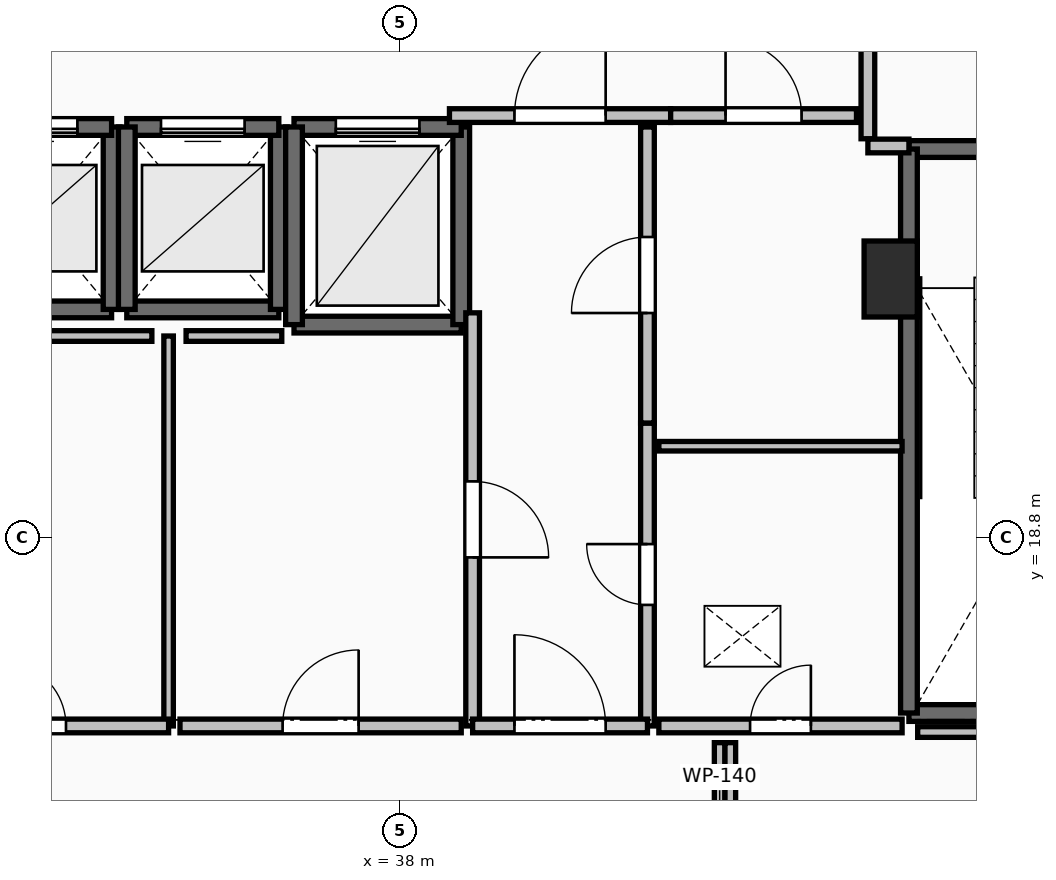
"""IFC4 building model, lengths in metres.
Left out: names, types, materials, properties, quantities, classifications, styles, units other than length and angle.
Written with IfcOpenShell. Run it as: python <this file> out.ifc"""

import sys

from ifc_helpers import new_model, si_unit, direction, frame, frame_2d, origin, origin_2d, place, context, subcontext, project, spatial, rectangle, extrude, element, fill, save


model = new_model("IFC4")
c1 = context("Model", 3, precision=1e-05, world=origin(), true_north=direction((0.0, 1.0)))
c2 = subcontext(c1, "Body", "Model", "MODEL_VIEW")
j1 = project(units=[si_unit("LENGTHUNIT", "METRE"), si_unit("PLANEANGLEUNIT", "RADIAN")], contexts=[c1])
p1 = place(None, origin())
s1 = spatial("IfcSite", under=j1, at=p1, CompositionType="ELEMENT")
p2 = place(p1, origin())
s2 = spatial("IfcBuilding", under=s1, at=p2, CompositionType="ELEMENT")
p3 = place(p2, frame((0.0, 0.0, 217.85)))
s3 = spatial("IfcBuildingStorey", under=s2, at=p3, CompositionType="ELEMENT", Elevation=217.85)
p4 = place(p3, frame((44.45, 22.2, 0.0), z_axis=(0.0, 0.0, 1.0), x_axis=(1.0, 0.0, 0.0)))
e1 = element("IfcColumn", 1, at=p4, inside=s3, PredefinedType="PILASTER", context=c2, shape_type="SweptSolid", body=[
    extrude(rectangle(XDim=0.7, YDim=1.0, at=origin_2d()), origin(), (0.0, 0.0, 1.0), 3.55),
])
p5 = place(p3, frame((44.69, 23.91, 0.0), z_axis=(0.0, 0.0, 1.0), x_axis=(1.0, 0.0, 0.0)))
e2 = element("IfcWall", 2, at=p5, inside=s3, PredefinedType="SOLIDWALL", context=c2, shape_type="SweptSolid", body=[
    extrude(rectangle(XDim=3.37, YDim=0.22, at=frame_2d((1.685, 0.0))), origin(), (0.0, 0.0, 1.0), 3.29),
])
p6 = place(p5, frame((1.135, 0.0, 0.0)))
e3 = element("IfcOpeningElement", 3, at=p6, cuts=e2, PredefinedType="OPENING", context=c2, shape_type="SweptSolid", body=[
    extrude(rectangle(XDim=1.1, YDim=2.15, at=frame_2d((0.55, 1.075))), frame((0.0, 0.125, 0.0), z_axis=(0.0, -1.0, 0.0), x_axis=(1.0, 0.0, 0.0)), (0.0, 0.0, 1.0), 0.25),
])
p7 = place(p3, frame((48.06, 16.49, 0.0), z_axis=(0.0, 0.0, 1.0), x_axis=(-1.0, 0.0, 0.0)))
e4 = element("IfcWall", 4, at=p7, inside=s3, PredefinedType="SOLIDWALL", context=c2, shape_type="SweptSolid", body=[
    extrude(rectangle(XDim=3.37, YDim=0.22, at=frame_2d((1.685, 0.0))), origin(), (0.0, 0.0, 1.0), 3.29),
])
p8 = place(p3, frame((44.69, 16.49, 0.0), z_axis=(0.0, 0.0, 1.0), x_axis=(0.0, 1.0, 0.0)))
e5 = element("IfcWall", 5, at=p8, inside=s3, PredefinedType="SOLIDWALL", context=c2, shape_type="SweptSolid", body=[
    extrude(rectangle(XDim=7.42, YDim=0.22, at=frame_2d((3.71, 0.0))), origin(), (0.0, 0.0, 1.0), 3.29),
])
p9 = place(p3, frame((32.2, 21.8, 0.0), z_axis=(0.0, 0.0, 1.0), x_axis=(1.0, 0.0, 0.0)))
e6 = element("IfcWall", 6, at=p9, inside=s3, PredefinedType="SOLIDWALL", context=c2, shape_type="SweptSolid", body=[
    extrude(rectangle(XDim=2.0, YDim=0.22, at=frame_2d((1.0, 0.0))), origin(), (0.0, 0.0, 1.0), 3.29),
])
p10 = place(p3, frame((34.2, 21.8, 0.0), z_axis=(0.0, 0.0, 1.0), x_axis=(0.0, 1.0, 0.0)))
e7 = element("IfcWall", 7, at=p10, inside=s3, PredefinedType="SOLIDWALL", context=c2, shape_type="SweptSolid", body=[
    extrude(rectangle(XDim=2.4, YDim=0.22, at=frame_2d((1.2, 0.0))), origin(), (0.0, 0.0, 1.0), 3.29),
])
p11 = place(p3, frame((34.2, 24.2, 0.0), z_axis=(0.0, 0.0, 1.0), x_axis=(-1.0, 0.0, 0.0)))
e8 = element("IfcWall", 8, at=p11, inside=s3, PredefinedType="SOLIDWALL", context=c2, shape_type="SweptSolid", body=[
    extrude(rectangle(XDim=2.0, YDim=0.22, at=frame_2d((1.0, 0.0))), origin(), (0.0, 0.0, 1.0), 3.29),
])
p12 = place(p11, frame((0.45, 0.0, 0.0)))
e9 = element("IfcOpeningElement", 9, at=p12, cuts=e8, PredefinedType="OPENING", context=c2, shape_type="SweptSolid", body=[
    extrude(rectangle(XDim=1.1, YDim=2.2, at=frame_2d((0.55, 1.1))), frame((0.0, 0.125, 0.0), z_axis=(0.0, -1.0, 0.0), x_axis=(1.0, 0.0, 0.0)), (0.0, 0.0, 1.0), 0.25),
])
p13 = place(p3, frame((34.4, 21.8, 0.0), z_axis=(0.0, 0.0, 1.0), x_axis=(1.0, 0.0, 0.0)))
e10 = element("IfcWall", 10, at=p13, inside=s3, PredefinedType="SOLIDWALL", context=c2, shape_type="SweptSolid", body=[
    extrude(rectangle(XDim=2.0, YDim=0.22, at=frame_2d((1.0, 0.0))), origin(), (0.0, 0.0, 1.0), 3.29),
])
p14 = place(p3, frame((36.4, 21.8, 0.0), z_axis=(0.0, 0.0, 1.0), x_axis=(0.0, 1.0, 0.0)))
e11 = element("IfcWall", 11, at=p14, inside=s3, PredefinedType="SOLIDWALL", context=c2, shape_type="SweptSolid", body=[
    extrude(rectangle(XDim=2.4, YDim=0.22, at=frame_2d((1.2, 0.0))), origin(), (0.0, 0.0, 1.0), 3.29),
])
p15 = place(p3, frame((36.4, 24.2, 0.0), z_axis=(0.0, 0.0, 1.0), x_axis=(-1.0, 0.0, 0.0)))
e12 = element("IfcWall", 12, at=p15, inside=s3, PredefinedType="SOLIDWALL", context=c2, shape_type="SweptSolid", body=[
    extrude(rectangle(XDim=2.0, YDim=0.22, at=frame_2d((1.0, 0.0))), origin(), (0.0, 0.0, 1.0), 3.29),
])
p16 = place(p15, frame((0.45, 0.0, 0.0)))
e13 = element("IfcOpeningElement", 13, at=p16, cuts=e12, PredefinedType="OPENING", context=c2, shape_type="SweptSolid", body=[
    extrude(rectangle(XDim=1.1, YDim=2.2, at=frame_2d((0.55, 1.1))), frame((0.0, 0.125, 0.0), z_axis=(0.0, -1.0, 0.0), x_axis=(1.0, 0.0, 0.0)), (0.0, 0.0, 1.0), 0.25),
])
p17 = place(p3, frame((34.4, 24.2, 0.0), z_axis=(0.0, 0.0, 1.0), x_axis=(0.0, -1.0, 0.0)))
e14 = element("IfcWall", 14, at=p17, inside=s3, PredefinedType="SOLIDWALL", context=c2, shape_type="SweptSolid", body=[
    extrude(rectangle(XDim=2.4, YDim=0.22, at=frame_2d((1.2, 0.0))), origin(), (0.0, 0.0, 1.0), 3.29),
])
p18 = place(p3, frame((36.6, 21.6, 0.0), z_axis=(0.0, 0.0, 1.0), x_axis=(1.0, 0.0, 0.0)))
e15 = element("IfcWall", 15, at=p18, inside=s3, PredefinedType="SOLIDWALL", context=c2, shape_type="SweptSolid", body=[
    extrude(rectangle(XDim=2.2, YDim=0.22, at=frame_2d((1.1, 0.0))), origin(), (0.0, 0.0, 1.0), 3.29),
])
p19 = place(p3, frame((38.8, 21.6, 0.0), z_axis=(0.0, 0.0, 1.0), x_axis=(0.0, 1.0, 0.0)))
e16 = element("IfcWall", 16, at=p19, inside=s3, PredefinedType="SOLIDWALL", context=c2, shape_type="SweptSolid", body=[
    extrude(rectangle(XDim=2.6, YDim=0.22, at=frame_2d((1.3, 0.0))), origin(), (0.0, 0.0, 1.0), 3.29),
])
p20 = place(p3, frame((38.8, 24.2, 0.0), z_axis=(0.0, 0.0, 1.0), x_axis=(-1.0, 0.0, 0.0)))
e17 = element("IfcWall", 17, at=p20, inside=s3, PredefinedType="SOLIDWALL", context=c2, shape_type="SweptSolid", body=[
    extrude(rectangle(XDim=2.2, YDim=0.22, at=frame_2d((1.1, 0.0))), origin(), (0.0, 0.0, 1.0), 3.29),
])
p21 = place(p20, frame((0.55, 0.0, 0.0)))
e18 = element("IfcOpeningElement", 18, at=p21, cuts=e17, PredefinedType="OPENING", context=c2, shape_type="SweptSolid", body=[
    extrude(rectangle(XDim=1.1, YDim=2.2, at=frame_2d((0.55, 1.1))), frame((0.0, 0.125, 0.0), z_axis=(0.0, -1.0, 0.0), x_axis=(1.0, 0.0, 0.0)), (0.0, 0.0, 1.0), 0.25),
])
p22 = place(p3, frame((36.6, 24.2, 0.0), z_axis=(0.0, 0.0, 1.0), x_axis=(0.0, -1.0, 0.0)))
e19 = element("IfcWall", 19, at=p22, inside=s3, PredefinedType="SOLIDWALL", context=c2, shape_type="SweptSolid", body=[
    extrude(rectangle(XDim=2.6, YDim=0.22, at=frame_2d((1.3, 0.0))), origin(), (0.0, 0.0, 1.0), 3.29),
])
p23 = place(p3, frame((44.15, 27.955, 0.0), z_axis=(0.0, 0.0, 1.0), x_axis=(0.0, -1.0, 0.0)))
e20 = element("IfcWall", 20, at=p23, inside=s3, PredefinedType="PARTITIONING", context=c2, shape_type="SweptSolid", body=[
    extrude(rectangle(XDim=3.91, YDim=0.18, at=frame_2d((1.955, 0.0))), origin(), (0.0, 0.0, 1.0), 3.29),
])
p24 = place(p23, frame((1.355, 0.0, 0.0)))
e21 = element("IfcOpeningElement", 21, at=p24, cuts=e20, PredefinedType="OPENING", context=c2, shape_type="SweptSolid", body=[
    extrude(rectangle(XDim=1.2, YDim=2.15, at=frame_2d((0.6, 1.075))), frame((0.0, 0.105, 0.0), z_axis=(0.0, -1.0, 0.0), x_axis=(1.0, 0.0, 0.0)), (0.0, 0.0, 1.0), 0.21),
])
p25 = place(p3, frame((44.15, 23.95, 0.0), z_axis=(0.0, 0.0, 1.0), x_axis=(1.0, 0.0, 0.0)))
e22 = element("IfcWall", 22, at=p25, inside=s3, PredefinedType="PARTITIONING", context=c2, shape_type="SweptSolid", body=[
    extrude(rectangle(XDim=0.54, YDim=0.18, at=frame_2d((0.27, 0.0))), origin(), (0.0, 0.0, 1.0), 3.29),
])
p26 = place(p3, frame((38.645, 24.35, 0.0), z_axis=(0.0, 0.0, 1.0), x_axis=(1.0, 0.0, 0.0)))
e23 = element("IfcWall", 23, at=p26, inside=s3, PredefinedType="PARTITIONING", context=c2, shape_type="SweptSolid", body=[
    extrude(rectangle(XDim=2.91, YDim=0.18, at=frame_2d((1.455, 0.0))), origin(), (0.0, 0.0, 1.0), 3.29),
])
p27 = place(p26, frame((0.855, 0.0, 0.0)))
e24 = element("IfcOpeningElement", 24, at=p27, cuts=e23, PredefinedType="OPENING", context=c2, shape_type="SweptSolid", body=[
    extrude(rectangle(XDim=1.2, YDim=2.15, at=frame_2d((0.6, 1.075))), frame((0.0, 0.105, 0.0), z_axis=(0.0, -1.0, 0.0), x_axis=(1.0, 0.0, 0.0)), (0.0, 0.0, 1.0), 0.21),
])
p28 = place(p3, frame((41.555, 24.35, 0.0), z_axis=(0.0, 0.0, 1.0), x_axis=(1.0, 0.0, 0.0)))
e25 = element("IfcWall", 25, at=p28, inside=s3, PredefinedType="PARTITIONING", context=c2, shape_type="SweptSolid", body=[
    extrude(rectangle(XDim=2.445, YDim=0.18, at=frame_2d((1.223, 0.0))), origin(), (0.0, 0.0, 1.0), 3.29),
])
p29 = place(p28, frame((0.722, 0.0, 0.0)))
e26 = element("IfcOpeningElement", 26, at=p29, cuts=e25, PredefinedType="OPENING", context=c2, shape_type="SweptSolid", body=[
    extrude(rectangle(XDim=1.0, YDim=2.15, at=frame_2d((0.5, 1.075))), frame((0.0, 0.105, 0.0), z_axis=(0.0, -1.0, 0.0), x_axis=(1.0, 0.0, 0.0)), (0.0, 0.0, 1.0), 0.21),
])
p30 = place(p3, frame((41.25, 16.32, 0.0), z_axis=(0.0, 0.0, 1.0), x_axis=(0.0, 1.0, 0.0)))
e27 = element("IfcWall", 27, at=p30, inside=s3, PredefinedType="PARTITIONING", context=c2, shape_type="SweptSolid", body=[
    extrude(rectangle(XDim=3.985, YDim=0.18, at=frame_2d((1.992, 0.0))), origin(), (0.0, 0.0, 1.0), 3.29),
])
p31 = place(p30, frame((1.593, 0.0, 0.0)))
e28 = element("IfcOpeningElement", 28, at=p31, cuts=e27, PredefinedType="OPENING", context=c2, shape_type="SweptSolid", body=[
    extrude(rectangle(XDim=0.8, YDim=2.05, at=frame_2d((0.4, 1.025))), frame((0.0, 0.105, 0.0), z_axis=(0.0, -1.0, 0.0), x_axis=(1.0, 0.0, 0.0)), (0.0, 0.0, 1.0), 0.21),
])
p32 = place(p3, frame((41.25, 20.305, 0.0), z_axis=(0.0, 0.0, 1.0), x_axis=(0.0, 1.0, 0.0)))
e29 = element("IfcWall", 29, at=p32, inside=s3, PredefinedType="PARTITIONING", context=c2, shape_type="SweptSolid", body=[
    extrude(rectangle(XDim=3.895, YDim=0.18, at=frame_2d((1.948, 0.0))), origin(), (0.0, 0.0, 1.0), 3.29),
])
p33 = place(p32, frame((1.448, 0.0, 0.0)))
e30 = element("IfcOpeningElement", 30, at=p33, cuts=e29, PredefinedType="OPENING", context=c2, shape_type="SweptSolid", body=[
    extrude(rectangle(XDim=1.0, YDim=2.15, at=frame_2d((0.5, 1.075))), frame((0.0, 0.105, 0.0), z_axis=(0.0, -1.0, 0.0), x_axis=(1.0, 0.0, 0.0)), (0.0, 0.0, 1.0), 0.21),
])
p34 = place(p3, frame((38.95, 21.755, 0.0), z_axis=(0.0, 0.0, 1.0), x_axis=(0.0, -1.0, 0.0)))
e31 = element("IfcWall", 31, at=p34, inside=s3, PredefinedType="PARTITIONING", context=c2, shape_type="SweptSolid", body=[
    extrude(rectangle(XDim=5.435, YDim=0.18, at=frame_2d((2.717, 0.0))), origin(), (0.0, 0.0, 1.0), 3.29),
])
p35 = place(p34, frame((2.218, 0.0, 0.0)))
e32 = element("IfcOpeningElement", 32, at=p35, cuts=e31, PredefinedType="OPENING", context=c2, shape_type="SweptSolid", body=[
    extrude(rectangle(XDim=1.0, YDim=2.15, at=frame_2d((0.5, 1.075))), frame((0.0, 0.105, 0.0), z_axis=(0.0, -1.0, 0.0), x_axis=(1.0, 0.0, 0.0)), (0.0, 0.0, 1.0), 0.21),
])
p36 = place(p3, frame((38.95, 16.32, 0.0), z_axis=(0.0, 0.0, 1.0), x_axis=(1.0, 0.0, 0.0)))
e33 = element("IfcWall", 33, at=p36, inside=s3, PredefinedType="PARTITIONING", context=c2, shape_type="SweptSolid", body=[
    extrude(rectangle(XDim=2.3, YDim=0.18, at=frame_2d((1.15, 0.0))), origin(), (0.0, 0.0, 1.0), 3.29),
])
p37 = place(p36, frame((0.55, 0.0, 0.0)))
e34 = element("IfcOpeningElement", 34, at=p37, cuts=e33, PredefinedType="OPENING", context=c2, shape_type="SweptSolid", body=[
    extrude(rectangle(XDim=1.2, YDim=2.15, at=frame_2d((0.6, 1.075))), frame((0.0, 0.105, 0.0), z_axis=(0.0, -1.0, 0.0), x_axis=(1.0, 0.0, 0.0)), (0.0, 0.0, 1.0), 0.21),
])
p38 = place(p3, frame((44.6, 20.0, 0.0), z_axis=(0.0, 0.0, 1.0), x_axis=(-1.0, 0.0, 0.0)))
e35 = element("IfcWall", 35, at=p38, inside=s3, PredefinedType="PARTITIONING", context=c2, shape_type="SweptSolid", body=[
    extrude(rectangle(XDim=3.2, YDim=0.125, at=frame_2d((1.6, 0.0))), origin(), (0.0, 0.0, 1.0), 3.29),
])
p39 = place(p3, frame((41.4, 16.32, 0.0), z_axis=(0.0, 0.0, 1.0), x_axis=(1.0, 0.0, 0.0)))
e36 = element("IfcWall", 36, at=p39, inside=s3, PredefinedType="PARTITIONING", context=c2, shape_type="SweptSolid", body=[
    extrude(rectangle(XDim=3.2, YDim=0.18, at=frame_2d((1.6, 0.0))), origin(), (0.0, 0.0, 1.0), 3.29),
])
p40 = place(p39, frame((1.2, 0.0, 0.0)))
e37 = element("IfcOpeningElement", 37, at=p40, cuts=e36, PredefinedType="OPENING", context=c2, shape_type="SweptSolid", body=[
    extrude(rectangle(XDim=0.8, YDim=2.05, at=frame_2d((0.4, 1.025))), frame((0.0, 0.105, 0.0), z_axis=(0.0, -1.0, 0.0), x_axis=(1.0, 0.0, 0.0)), (0.0, 0.0, 1.0), 0.21),
])
p41 = place(p3, frame((34.95, 16.32, 0.0), z_axis=(0.0, 0.0, 1.0), x_axis=(0.0, 1.0, 0.0)))
e38 = element("IfcWall", 38, at=p41, inside=s3, PredefinedType="PARTITIONING", context=c2, shape_type="SweptSolid", body=[
    extrude(rectangle(XDim=5.13, YDim=0.125, at=frame_2d((2.565, 0.0))), origin(), (0.0, 0.0, 1.0), 3.29),
])
p42 = place(p3, frame((31.4, 16.32, 0.0), z_axis=(0.0, 0.0, 1.0), x_axis=(1.0, 0.0, 0.0)))
e39 = element("IfcWall", 39, at=p42, inside=s3, PredefinedType="PARTITIONING", context=c2, shape_type="SweptSolid", body=[
    extrude(rectangle(XDim=3.55, YDim=0.18, at=frame_2d((1.775, 0.0))), origin(), (0.0, 0.0, 1.0), 3.29),
])
p43 = place(p42, frame((1.35, 0.0, 0.0)))
e40 = element("IfcOpeningElement", 40, at=p43, cuts=e39, PredefinedType="OPENING", context=c2, shape_type="SweptSolid", body=[
    extrude(rectangle(XDim=0.85, YDim=2.1, at=frame_2d((0.425, 1.05))), frame((0.0, 0.105, 0.0), z_axis=(0.0, -1.0, 0.0), x_axis=(1.0, 0.0, 0.0)), (0.0, 0.0, 1.0), 0.21),
])
p44 = place(p3, frame((35.1, 16.32, 0.0), z_axis=(0.0, 0.0, 1.0), x_axis=(1.0, 0.0, 0.0)))
e41 = element("IfcWall", 41, at=p44, inside=s3, PredefinedType="PARTITIONING", context=c2, shape_type="SweptSolid", body=[
    extrude(rectangle(XDim=3.7, YDim=0.18, at=frame_2d((1.85, 0.0))), origin(), (0.0, 0.0, 1.0), 3.29),
])
p45 = place(p44, frame((1.35, 0.0, 0.0)))
e42 = element("IfcOpeningElement", 42, at=p45, cuts=e41, PredefinedType="OPENING", context=c2, shape_type="SweptSolid", body=[
    extrude(rectangle(XDim=1.0, YDim=2.15, at=frame_2d((0.5, 1.075))), frame((0.0, 0.105, 0.0), z_axis=(0.0, -1.0, 0.0), x_axis=(1.0, 0.0, 0.0)), (0.0, 0.0, 1.0), 0.21),
])
p46 = place(p3, frame((34.73, 21.45, 0.0), z_axis=(0.0, 0.0, 1.0), x_axis=(-1.0, 0.0, 0.0)))
e43 = element("IfcWall", 43, at=p46, inside=s3, PredefinedType="PARTITIONING", context=c2, shape_type="SweptSolid", body=[
    extrude(rectangle(XDim=3.2, YDim=0.14, at=frame_2d((1.6, 0.0))), origin(), (0.0, 0.0, 1.0), 3.29),
])
p47 = place(p3, frame((36.439, 21.45, 0.0), z_axis=(0.0, 0.0, 1.0), x_axis=(-1.0, 0.0, 0.0)))
e44 = element("IfcWall", 44, at=p47, inside=s3, PredefinedType="PARTITIONING", context=c2, shape_type="SweptSolid", body=[
    extrude(rectangle(XDim=1.259, YDim=0.14, at=frame_2d((0.629, 0.0))), origin(), (0.0, 0.0, 1.0), 3.29),
])
for number, where, z_axis, x_axis in (
    (45, (42.2, 16.1, 0.0), (0.0, 0.0, 1.0), (0.0, -1.0, 0.0)),
    (46, (42.34, 14.27, 0.0), (0.0, 0.0, 1.0), (0.0, 1.0, 0.0)),
):
    element("IfcWall", number, at=place(p3, frame(where, z_axis=z_axis, x_axis=x_axis)), inside=s3, PredefinedType="PARTITIONING", context=c2, shape_type="SweptSolid", body=[
        extrude(rectangle(XDim=1.83, YDim=0.14, at=frame_2d((0.915, 0.0))), origin(), (0.0, 0.0, 1.0), 3.29),
    ])
p48 = place(p3, frame((44.805, 16.24, 0.0), z_axis=(0.0, 0.0, 1.0), x_axis=(1.0, 0.0, 0.0)))
e47 = element("IfcWall", 47, at=p48, inside=s3, PredefinedType="PARTITIONING", context=c2, shape_type="SweptSolid", body=[
    extrude(rectangle(XDim=3.745, YDim=0.14, at=frame_2d((1.873, 0.0))), origin(), (0.0, 0.0, 1.0), 2.482),
])
p49 = place(p12, origin())
e48 = element("IfcDoor", 48, at=p49, inside=s3, OperationType="SLIDING_TO_LEFT", PredefinedType="DOOR", context=c2, shape_type="SweptSolid", body=[
    extrude(rectangle(XDim=1.1, YDim=2.2, at=frame_2d((0.55, 1.1))), frame((0.0, 0.025, 0.0), z_axis=(0.0, -1.0, 0.0), x_axis=(1.0, 0.0, 0.0)), (0.0, 0.0, 1.0), 0.05),
])
fill(e9, e48)
p50 = place(p16, origin())
e49 = element("IfcDoor", 49, at=p50, inside=s3, OperationType="SLIDING_TO_LEFT", PredefinedType="DOOR", context=c2, shape_type="SweptSolid", body=[
    extrude(rectangle(XDim=1.1, YDim=2.2, at=frame_2d((0.55, 1.1))), frame((0.0, 0.025, 0.0), z_axis=(0.0, -1.0, 0.0), x_axis=(1.0, 0.0, 0.0)), (0.0, 0.0, 1.0), 0.05),
])
fill(e13, e49)
p51 = place(p21, origin())
e50 = element("IfcDoor", 50, at=p51, inside=s3, OperationType="SLIDING_TO_LEFT", PredefinedType="DOOR", context=c2, shape_type="SweptSolid", body=[
    extrude(rectangle(XDim=1.1, YDim=2.2, at=frame_2d((0.55, 1.1))), frame((0.0, 0.025, 0.0), z_axis=(0.0, -1.0, 0.0), x_axis=(1.0, 0.0, 0.0)), (0.0, 0.0, 1.0), 0.05),
])
fill(e18, e50)
p52 = place(p27, origin())
e51 = element("IfcDoor", 51, at=p52, inside=s3, OperationType="SINGLE_SWING_RIGHT", PredefinedType="DOOR", context=c2, shape_type="SweptSolid", body=[
    extrude(rectangle(XDim=1.2, YDim=2.15, at=frame_2d((0.6, 1.075))), frame((0.0, 0.025, 0.0), z_axis=(0.0, -1.0, 0.0), x_axis=(1.0, 0.0, 0.0)), (0.0, 0.0, 1.0), 0.05),
])
fill(e24, e51)
p53 = place(p29, origin())
e52 = element("IfcDoor", 52, at=p53, inside=s3, OperationType="SINGLE_SWING_LEFT", PredefinedType="DOOR", context=c2, shape_type="SweptSolid", body=[
    extrude(rectangle(XDim=1.0, YDim=2.15, at=frame_2d((0.5, 1.075))), frame((0.0, 0.025, 0.0), z_axis=(0.0, -1.0, 0.0), x_axis=(1.0, 0.0, 0.0)), (0.0, 0.0, 1.0), 0.05),
])
fill(e26, e52)
p54 = place(p31, origin())
e53 = element("IfcDoor", 53, at=p54, inside=s3, OperationType="SINGLE_SWING_RIGHT", PredefinedType="DOOR", context=c2, shape_type="SweptSolid", body=[
    extrude(rectangle(XDim=0.8, YDim=2.05, at=frame_2d((0.4, 1.025))), frame((0.0, 0.025, 0.0), z_axis=(0.0, -1.0, 0.0), x_axis=(1.0, 0.0, 0.0)), (0.0, 0.0, 1.0), 0.05),
])
fill(e28, e53)
p55 = place(p33, origin())
e54 = element("IfcDoor", 54, at=p55, inside=s3, OperationType="SINGLE_SWING_LEFT", PredefinedType="DOOR", context=c2, shape_type="SweptSolid", body=[
    extrude(rectangle(XDim=1.0, YDim=2.15, at=frame_2d((0.5, 1.075))), frame((0.0, 0.025, 0.0), z_axis=(0.0, -1.0, 0.0), x_axis=(1.0, 0.0, 0.0)), (0.0, 0.0, 1.0), 0.05),
])
fill(e30, e54)
p56 = place(p35, origin())
e55 = element("IfcDoor", 55, at=p56, inside=s3, OperationType="SINGLE_SWING_RIGHT", PredefinedType="DOOR", context=c2, shape_type="SweptSolid", body=[
    extrude(rectangle(XDim=1.0, YDim=2.15, at=frame_2d((0.5, 1.075))), frame((0.0, 0.025, 0.0), z_axis=(0.0, -1.0, 0.0), x_axis=(1.0, 0.0, 0.0)), (0.0, 0.0, 1.0), 0.05),
])
fill(e32, e55)
p57 = place(p37, origin())
e56 = element("IfcDoor", 56, at=p57, inside=s3, OperationType="SINGLE_SWING_LEFT", PredefinedType="DOOR", context=c2, shape_type="SweptSolid", body=[
    extrude(rectangle(XDim=1.2, YDim=2.15, at=frame_2d((0.6, 1.075))), frame((0.0, 0.025, 0.0), z_axis=(0.0, -1.0, 0.0), x_axis=(1.0, 0.0, 0.0)), (0.0, 0.0, 1.0), 0.05),
])
fill(e34, e56)
p58 = place(p40, origin())
e57 = element("IfcDoor", 57, at=p58, inside=s3, OperationType="SINGLE_SWING_RIGHT", PredefinedType="DOOR", context=c2, shape_type="SweptSolid", body=[
    extrude(rectangle(XDim=0.8, YDim=2.05, at=frame_2d((0.4, 1.025))), frame((0.0, 0.025, 0.0), z_axis=(0.0, -1.0, 0.0), x_axis=(1.0, 0.0, 0.0)), (0.0, 0.0, 1.0), 0.05),
])
fill(e37, e57)
p59 = place(p43, origin())
e58 = element("IfcDoor", 58, at=p59, inside=s3, OperationType="SINGLE_SWING_LEFT", PredefinedType="DOOR", context=c2, shape_type="SweptSolid", body=[
    extrude(rectangle(XDim=0.85, YDim=2.1, at=frame_2d((0.425, 1.05))), frame((0.0, 0.025, 0.0), z_axis=(0.0, -1.0, 0.0), x_axis=(1.0, 0.0, 0.0)), (0.0, 0.0, 1.0), 0.05),
])
fill(e40, e58)
p60 = place(p45, origin())
e59 = element("IfcDoor", 59, at=p60, inside=s3, OperationType="SINGLE_SWING_RIGHT", PredefinedType="DOOR", context=c2, shape_type="SweptSolid", body=[
    extrude(rectangle(XDim=1.0, YDim=2.15, at=frame_2d((0.5, 1.075))), frame((0.0, 0.025, 0.0), z_axis=(0.0, -1.0, 0.0), x_axis=(1.0, 0.0, 0.0)), (0.0, 0.0, 1.0), 0.05),
])
fill(e42, e59)
save(model, sys.argv[1])
